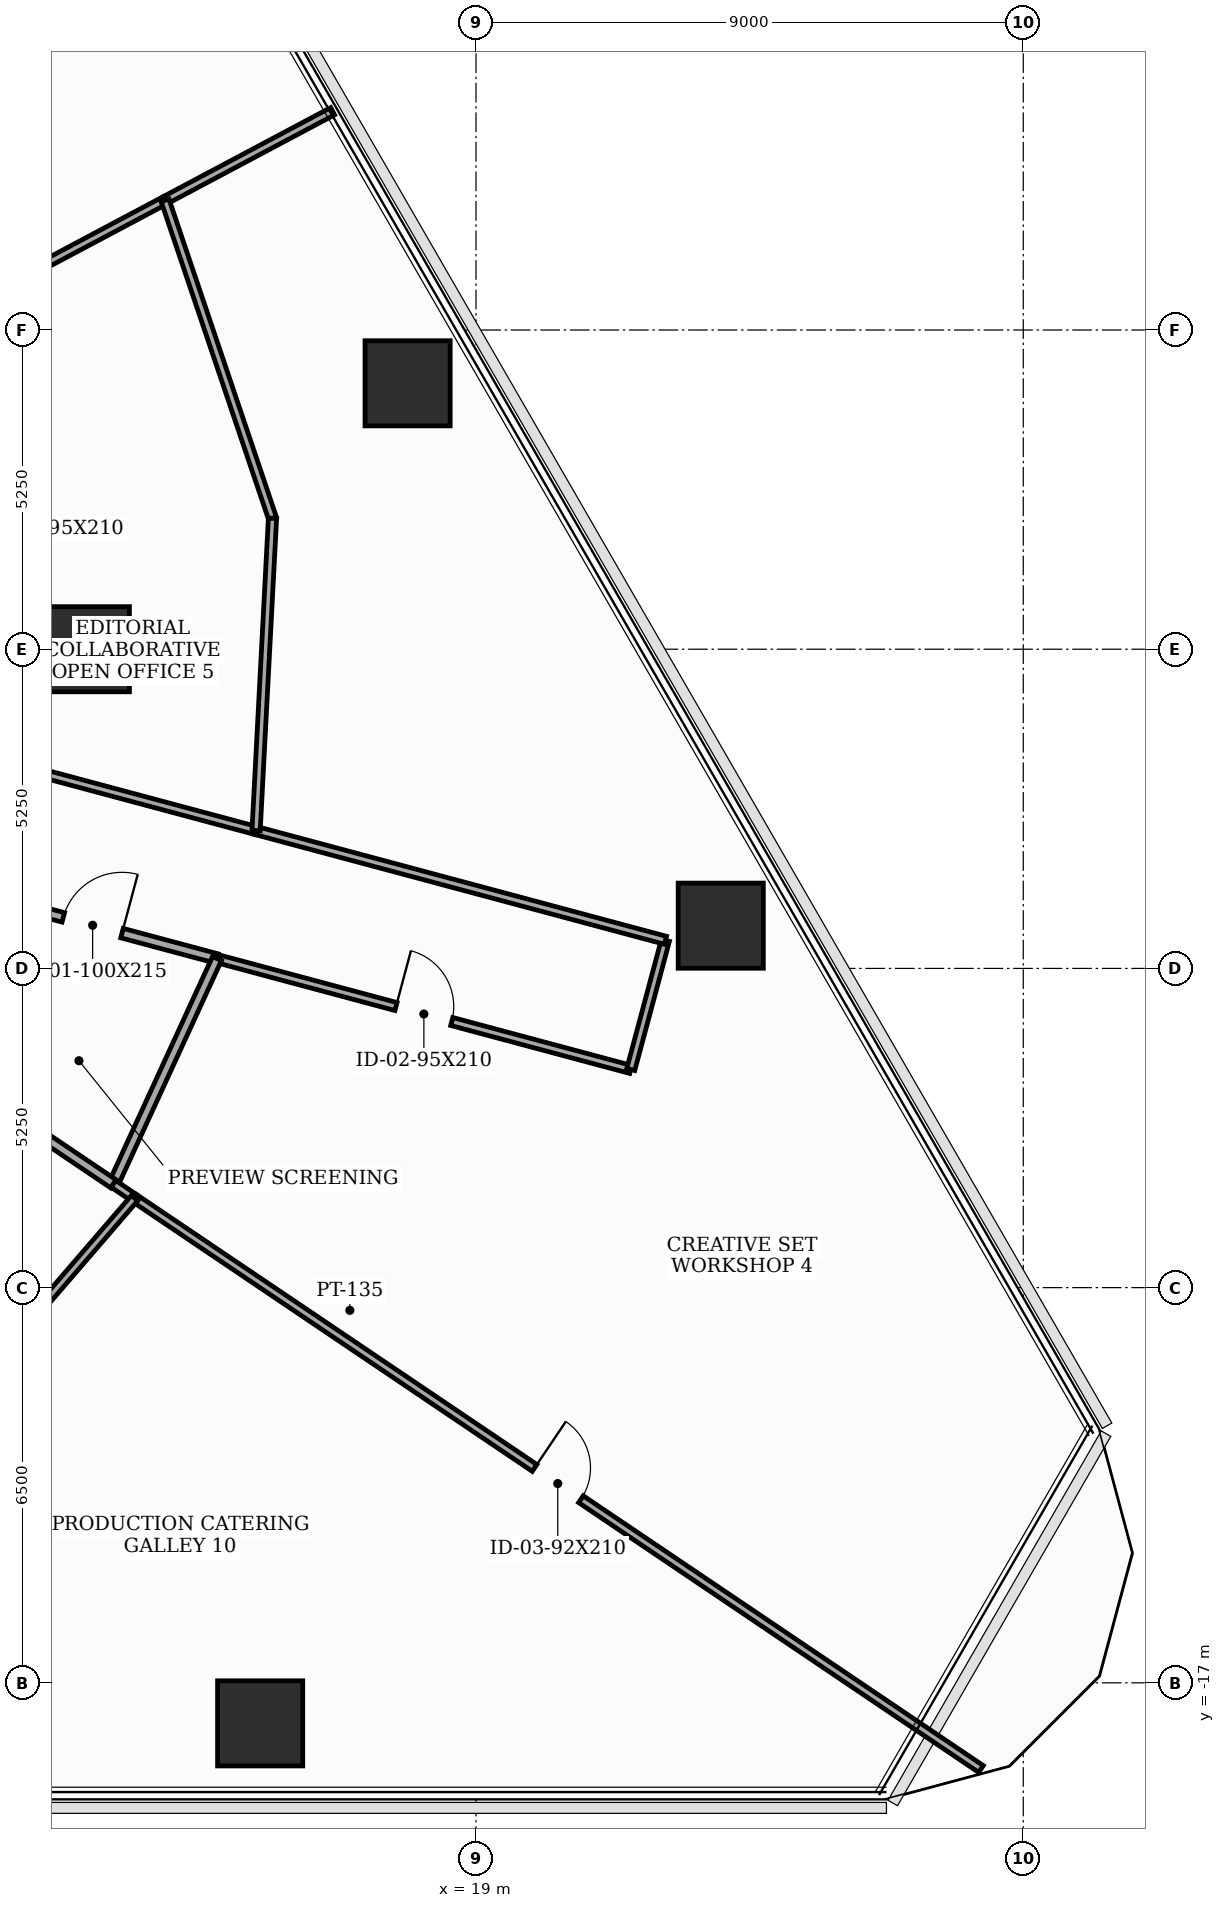
"""IFC4 building model, lengths in metres.
Left out: names, types, materials, properties, quantities, classifications, styles, units other than length and angle.
Written with IfcOpenShell. Run it as: python <this file> out.ifc"""

import sys

from ifc_helpers import new_model, si_unit, direction, frame, frame_2d, origin, origin_2d, place, context, subcontext, project, spatial, rectangle, extrude, element, fill, save


model = new_model("IFC4")
c1 = context("Model", 3, precision=1e-05, world=origin(), true_north=direction((0.0, 1.0)))
c2 = subcontext(c1, "Body", "Model", "MODEL_VIEW")
j1 = project(units=[si_unit("LENGTHUNIT", "METRE"), si_unit("PLANEANGLEUNIT", "RADIAN")], contexts=[c1])
p1 = place(None, origin())
s1 = spatial("IfcSite", under=j1, at=p1, CompositionType="ELEMENT")
p2 = place(p1, origin())
s2 = spatial("IfcBuilding", under=s1, at=p2, CompositionType="ELEMENT")
p3 = place(p2, frame((0.0, 0.0, 37.1)))
s3 = spatial("IfcBuildingStorey", under=s2, at=p3, CompositionType="ELEMENT", Elevation=37.1)
for number, where, z_axis, x_axis in (
    (1, (12.6, 0.0, 0.0), (0.0, 0.0, 1.0), (1.0, 0.0, 0.0)),
    (2, (15.45, -17.667, 0.0), (0.0, 0.0, 1.0), (1.0, 0.0, 0.0)),
    (3, (23.025, -4.547, 0.0), (0.0, 0.0, 1.0), (1.0, 0.0, 0.0)),
    (4, (17.875, 4.373, 0.0), (0.0, 0.0, 1.0), (1.0, 0.0, 0.0)),
):
    element("IfcColumn", number, at=place(p3, frame(where, z_axis=z_axis, x_axis=x_axis)), inside=s3, PredefinedType="COLUMN", context=c2, shape_type="SweptSolid", body=[
        extrude(rectangle(XDim=1.4, YDim=1.4, at=origin_2d()), origin(), (0.0, 0.0, 1.0), 3.7),
    ])
p4 = place(p3, frame((10.65, -3.992, 0.0), z_axis=(0.0, 0.0, 1.0), x_axis=(0.965925146235, -0.258821583086, 0.0)))
e5 = element("IfcWall", 5, at=p4, inside=s3, PredefinedType="PARTITIONING", context=c2, shape_type="SweptSolid", body=[
    extrude(rectangle(XDim=4.234, YDim=0.16, at=frame_2d((2.117, 0.0))), origin(), (0.0, 0.0, 1.0), 2.785),
])
p5 = place(p4, frame((1.617, 0.0, 0.0)))
e6 = element("IfcOpeningElement", 6, at=p5, cuts=e5, PredefinedType="OPENING", context=c2, shape_type="SweptSolid", body=[
    extrude(rectangle(XDim=1.0, YDim=2.15, at=frame_2d((0.5, 1.075))), frame((0.0, 0.09, 0.0), z_axis=(0.0, -1.0, 0.0), x_axis=(1.0, 0.0, 0.0)), (0.0, 0.0, 1.0), 0.18),
])
p6 = place(p3, frame((14.74, -5.088, 0.0), z_axis=(0.0, 0.0, 1.0), x_axis=(0.965895912523, -0.258930659002, 0.0)))
e7 = element("IfcWall", 7, at=p6, inside=s3, PredefinedType="PARTITIONING", context=c2, shape_type="SweptSolid", body=[
    extrude(rectangle(XDim=7.045, YDim=0.135, at=frame_2d((3.522, 0.0))), origin(), (0.0, 0.0, 1.0), 2.935),
])
p7 = place(p6, frame((3.048, 0.0, 0.0)))
e8 = element("IfcOpeningElement", 8, at=p7, cuts=e7, PredefinedType="OPENING", context=c2, shape_type="SweptSolid", body=[
    extrude(rectangle(XDim=0.95, YDim=2.1, at=frame_2d((0.475, 1.05))), frame((0.0, 0.077, 0.0), z_axis=(0.0, -1.0, 0.0), x_axis=(1.0, 0.0, 0.0)), (0.0, 0.0, 1.0), 0.155),
])
p8 = place(p3, frame((21.545, -6.912, 0.0), z_axis=(0.0, 0.0, 1.0), x_axis=(0.259105843213, 0.965848933329, 0.0)))
e9 = element("IfcWall", 9, at=p8, inside=s3, PredefinedType="PARTITIONING", context=c2, shape_type="SweptSolid", body=[
    extrude(rectangle(XDim=2.2, YDim=0.135, at=frame_2d((1.1, 0.0))), origin(), (0.0, 0.0, 1.0), 2.935),
])
p9 = place(p3, frame((22.115, -4.787, 0.0), z_axis=(0.0, 0.0, 1.0), x_axis=(-0.965912084765, 0.258870323726, 0.0)))
e10 = element("IfcWall", 10, at=p9, inside=s3, PredefinedType="PARTITIONING", context=c2, shape_type="SweptSolid", body=[
    extrude(rectangle(XDim=6.969, YDim=0.135, at=frame_2d((3.485, 0.0))), origin(), (0.0, 0.0, 1.0), 3.085),
])
p10 = place(p3, frame((15.383, -2.983, 0.0), z_axis=(0.0, 0.0, 1.0), x_axis=(-0.965947384406, 0.258738575706, 0.0)))
e11 = element("IfcWall", 11, at=p10, inside=s3, PredefinedType="PARTITIONING", context=c2, shape_type="SweptSolid", body=[
    extrude(rectangle(XDim=4.9, YDim=0.135, at=frame_2d((2.45, 0.0))), origin(), (0.0, 0.0, 1.0), 2.785),
])
p11 = place(p3, frame((13.886, 7.383, 0.0), z_axis=(0.0, 0.0, 1.0), x_axis=(0.88293033741, 0.469504014126, 0.0)))
e12 = element("IfcWall", 12, at=p11, inside=s3, PredefinedType="PARTITIONING", context=c2, shape_type="SweptSolid", body=[
    extrude(rectangle(XDim=3.122, YDim=0.135, at=frame_2d((1.561, 0.0))), origin(), (0.0, 0.0, 1.0), 2.935),
])
p12 = place(p3, frame((10.65, 5.663, 0.0), z_axis=(0.0, 0.0, 1.0), x_axis=(0.88302513666, 0.469325695041, 0.0)))
e13 = element("IfcWall", 13, at=p12, inside=s3, PredefinedType="PARTITIONING", context=c2, shape_type="SweptSolid", body=[
    extrude(rectangle(XDim=3.665, YDim=0.135, at=frame_2d((1.833, 0.0))), origin(), (0.0, 0.0, 1.0), 2.785),
])
p13 = place(p3, frame((13.038, -8.794, 0.0), z_axis=(0.0, 0.0, 1.0), x_axis=(0.417322480709, 0.908758464662, 0.0)))
e14 = element("IfcWall", 14, at=p13, inside=s3, PredefinedType="PARTITIONING", context=c2, shape_type="SweptSolid", body=[
    extrude(rectangle(XDim=4.078, YDim=0.16, at=frame_2d((2.039, 0.0))), origin(), (0.0, 0.0, 1.0), 3.5),
])
p14 = place(p3, frame((10.65, -7.184, 0.0), z_axis=(0.0, 0.0, 1.0), x_axis=(0.829196392101, -0.558957371654, 0.0)))
e15 = element("IfcWall", 15, at=p14, inside=s3, PredefinedType="PARTITIONING", context=c2, shape_type="SweptSolid", body=[
    extrude(rectangle(XDim=2.88, YDim=0.16, at=frame_2d((1.44, 0.0))), origin(), (0.0, 0.0, 1.0), 3.5),
])
p15 = place(p3, frame((13.886, 7.383, 0.0), z_axis=(0.0, 0.0, 1.0), x_axis=(0.320099223205, -0.947384023141, 0.0)))
e16 = element("IfcWall", 16, at=p15, inside=s3, PredefinedType="PARTITIONING", context=c2, shape_type="SweptSolid", body=[
    extrude(rectangle(XDim=5.521, YDim=0.135, at=frame_2d((2.76, 0.0))), origin(), (0.0, 0.0, 1.0), 2.685),
])
p16 = place(p3, frame((15.653, 2.153, 0.0), z_axis=(0.0, 0.0, 1.0), x_axis=(-0.05250152841, -0.998620843721, 0.0)))
e17 = element("IfcWall", 17, at=p16, inside=s3, PredefinedType="PARTITIONING", context=c2, shape_type="SweptSolid", body=[
    extrude(rectangle(XDim=5.143, YDim=0.135, at=frame_2d((2.572, 0.0))), origin(), (0.0, 0.0, 1.0), 2.685),
])
p17 = place(p3, frame((13.038, -8.794, 0.0), z_axis=(0.0, 0.0, 1.0), x_axis=(0.828163729679, -0.560486250361, 0.0)))
e18 = element("IfcWall", 18, at=p17, inside=s3, PredefinedType="PARTITIONING", context=c2, shape_type="SweptSolid", body=[
    extrude(rectangle(XDim=0.418, YDim=0.135, at=frame_2d((0.209, 0.0))), origin(), (0.0, 0.0, 1.0), 3.5),
])
p18 = place(p3, frame((13.384, -9.028, 0.0), z_axis=(0.0, 0.0, 1.0), x_axis=(0.829042972493, -0.55918489765, 0.0)))
e19 = element("IfcWall", 19, at=p18, inside=s3, PredefinedType="PARTITIONING", context=c2, shape_type="SweptSolid", body=[
    extrude(rectangle(XDim=16.791, YDim=0.135, at=frame_2d((8.396, 0.0))), origin(), (0.0, 0.0, 1.0), 2.935),
])
p19 = place(p18, frame((7.936, 0.0, 0.0)))
e20 = element("IfcOpeningElement", 20, at=p19, cuts=e19, PredefinedType="OPENING", context=c2, shape_type="SweptSolid", body=[
    extrude(rectangle(XDim=0.92, YDim=2.1, at=frame_2d((0.46, 1.05))), frame((0.0, 0.077, 0.0), z_axis=(0.0, -1.0, 0.0), x_axis=(1.0, 0.0, 0.0)), (0.0, 0.0, 1.0), 0.155),
])
p20 = place(p3, frame((10.628, -12.226, 0.0), z_axis=(0.0, 0.0, 1.0), x_axis=(0.652832083446, 0.757502654004, 0.0)))
e21 = element("IfcWall", 21, at=p20, inside=s3, PredefinedType="PARTITIONING", context=c2, shape_type="SweptSolid", body=[
    extrude(rectangle(XDim=4.222, YDim=0.135, at=frame_2d((2.111, 0.0))), origin(), (0.0, 0.0, 1.0), 3.5),
])
p21 = place(p5, origin())
e22 = element("IfcDoor", 22, at=p21, inside=s3, OperationType="SINGLE_SWING_RIGHT", PredefinedType="DOOR", context=c2, shape_type="SweptSolid", body=[
    extrude(rectangle(XDim=1.0, YDim=2.15, at=frame_2d((0.5, 1.075))), frame((0.0, 0.025, 0.0), z_axis=(0.0, -1.0, 0.0), x_axis=(1.0, 0.0, 0.0)), (0.0, 0.0, 1.0), 0.05),
])
fill(e6, e22)
p22 = place(p7, origin())
e23 = element("IfcDoor", 23, at=p22, inside=s3, OperationType="SINGLE_SWING_LEFT", PredefinedType="DOOR", context=c2, shape_type="SweptSolid", body=[
    extrude(rectangle(XDim=0.95, YDim=2.1, at=frame_2d((0.475, 1.05))), frame((0.0, 0.025, 0.0), z_axis=(0.0, -1.0, 0.0), x_axis=(1.0, 0.0, 0.0)), (0.0, 0.0, 1.0), 0.05),
])
fill(e8, e23)
p23 = place(p19, origin())
e24 = element("IfcDoor", 24, at=p23, inside=s3, OperationType="SINGLE_SWING_LEFT", PredefinedType="DOOR", context=c2, shape_type="SweptSolid", body=[
    extrude(rectangle(XDim=0.92, YDim=2.1, at=frame_2d((0.46, 1.05))), frame((0.0, 0.025, 0.0), z_axis=(0.0, -1.0, 0.0), x_axis=(1.0, 0.0, 0.0)), (0.0, 0.0, 1.0), 0.05),
])
fill(e20, e24)
save(model, sys.argv[1])
